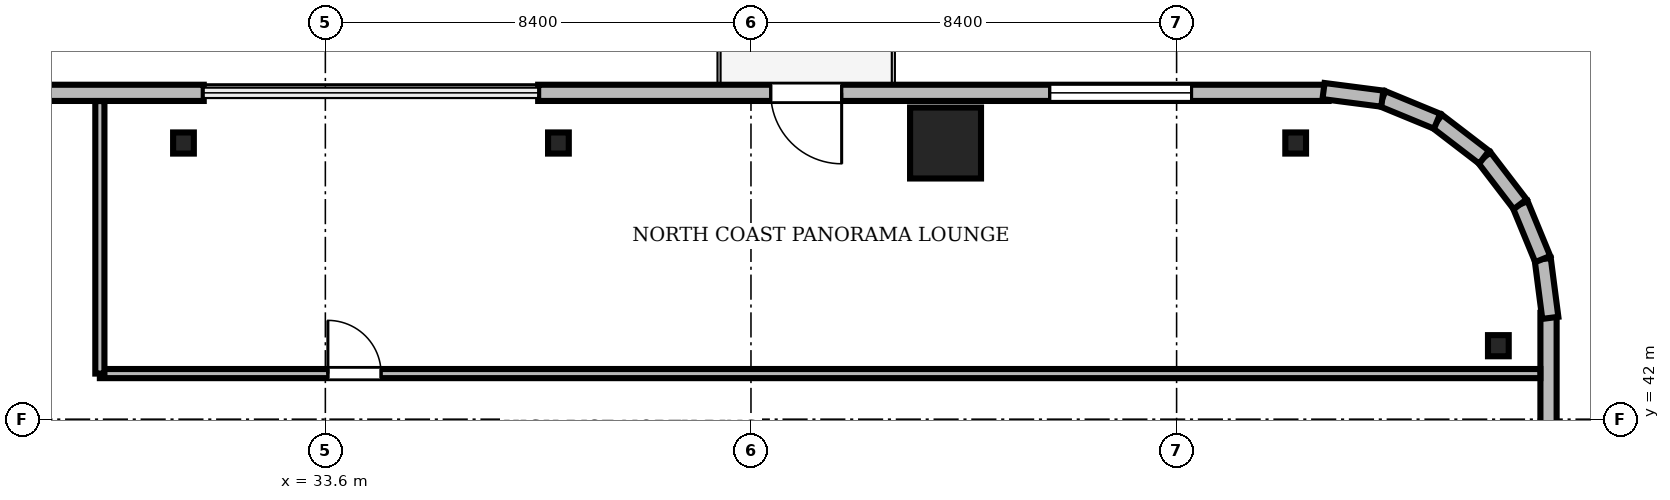
"""IFC4 building model, lengths in metres.
Left out: names, types, materials, properties, quantities, classifications, styles, units other than length and angle.
Written with IfcOpenShell. Run it as: python <this file> out.ifc"""

import sys

from ifc_helpers import new_model, si_unit, direction, frame, frame_2d, origin, origin_2d, place, context, subcontext, project, spatial, rectangle, i_section, extrude, source, transform, mapped, element, fill, save


model = new_model("IFC4")
c1 = context("Model", 3, precision=1e-05, world=origin(), true_north=direction((0.0, 1.0)))
c2 = subcontext(c1, "Body", "Model", "MODEL_VIEW")
j1 = project(units=[si_unit("LENGTHUNIT", "METRE"), si_unit("PLANEANGLEUNIT", "RADIAN")], contexts=[c1])
p1 = place(None, origin())
s1 = spatial("IfcSite", under=j1, at=p1, CompositionType="ELEMENT")
p2 = place(p1, origin())
s2 = spatial("IfcBuilding", under=s1, at=p2, CompositionType="ELEMENT")
p3 = place(p2, frame((0.0, 0.0, 233.55)))
s3 = spatial("IfcBuildingStorey", under=s2, at=p3, CompositionType="ELEMENT", Elevation=233.55)
m1 = source(origin(), c2, "Body", "SweptSolid", [
    extrude(rectangle(XDim=1.4, YDim=1.4, at=origin_2d()), origin(), (0.0, 0.0, 1.0), 3.1),
])
p4 = place(p3, frame((45.84, 47.45, 0.0), z_axis=(0.0, 0.0, 1.0), x_axis=(1.0, 0.0, 0.0)))
e1 = element("IfcColumn", 1, at=p4, inside=s3, PredefinedType="COLUMN", context=c2, shape_type="MappedRepresentation", body=[
    mapped(m1, transform((0.0, 0.0, 0.0), scale=1.0)),
])
m2 = source(origin(), c2, "Body", "SweptSolid", [
    extrude(i_section(OverallWidth=0.409, OverallDepth=0.417, WebThickness=0.021, FlangeThickness=0.033, FilletRadius=0.015, at=origin_2d()), origin(), (0.0, 0.0, 1.0), 3.1),
])
for number, where, z_axis, x_axis in (
    (2, (56.75, 43.45, 0.0), (0.0, 0.0, 1.0), (1.0, 0.0, 0.0)),
    (3, (52.75, 47.45, 0.0), (0.0, 0.0, 1.0), (1.0, 0.0, 0.0)),
    (4, (38.2, 47.45, 0.0), (0.0, 0.0, 1.0), (1.0, 0.0, 0.0)),
    (5, (30.8, 47.45, 0.0), (0.0, 0.0, 1.0), (1.0, 0.0, 0.0)),
):
    element("IfcColumn", number, at=place(p3, frame(where, z_axis=z_axis, x_axis=x_axis)), inside=s3, PredefinedType="COLUMN", context=c2, shape_type="MappedRepresentation", body=[
        mapped(m2, transform((0.0, 0.0, 0.0), scale=1.0)),
    ])
m3 = source(origin(), c2, "Body", "SweptSolid", [
    extrude(rectangle(XDim=15.6, YDim=0.32, at=frame_2d((7.8, 0.0))), origin(), (0.0, 0.0, 1.0), 3.1),
])
p5 = place(p3, frame((53.4, 48.44, 0.0), z_axis=(0.0, 0.0, 1.0), x_axis=(-1.0, 0.0, 0.0)))
e6 = element("IfcWall", 6, at=p5, inside=s3, PredefinedType="SOLIDWALL", context=c2, shape_type="MappedRepresentation", body=[
    mapped(m3, transform((0.0, 0.0, 0.0), scale=1.0)),
])
m4 = source(origin(), c2, "Body", "SweptSolid", [
    extrude(rectangle(XDim=1.4, YDim=2.3, at=frame_2d((0.7, 1.15))), frame((0.0, 0.17, 0.0), z_axis=(0.0, -1.0, 0.0), x_axis=(1.0, 0.0, 0.0)), (0.0, 0.0, 1.0), 0.34),
])
p6 = place(p5, frame((9.61, 0.0, 0.0)))
e7 = element("IfcOpeningElement", 7, at=p6, cuts=e6, PredefinedType="OPENING", context=c2, shape_type="MappedRepresentation", body=[
    mapped(m4, transform((0.0, 0.0, 0.0), scale=1.0)),
])
m5 = source(origin(), c2, "Body", "SweptSolid", [
    extrude(rectangle(XDim=2.8, YDim=2.4, at=frame_2d((1.4, 1.2))), frame((0.0, 0.17, 0.0), z_axis=(0.0, -1.0, 0.0), x_axis=(1.0, 0.0, 0.0)), (0.0, 0.0, 1.0), 0.34),
])
p7 = place(p5, frame((2.705, 0.0, 0.44)))
e8 = element("IfcOpeningElement", 8, at=p7, cuts=e6, PredefinedType="OPENING", context=c2, shape_type="MappedRepresentation", body=[
    mapped(m5, transform((0.0, 0.0, 0.0), scale=1.0)),
])
p8 = place(p3, frame((31.2, 48.44, 0.0), z_axis=(0.0, 0.0, 1.0), x_axis=(-1.0, 0.0, 0.0)))
e9 = element("IfcWall", 9, at=p8, inside=s3, PredefinedType="SOLIDWALL", context=c2, shape_type="MappedRepresentation", body=[
    mapped(m3, transform((0.0, 0.0, 0.0), scale=1.0)),
])
p9 = place(p8, frame((10.095, 0.0, 0.44)))
e10 = element("IfcOpeningElement", 10, at=p9, cuts=e9, PredefinedType="OPENING", context=c2, shape_type="MappedRepresentation", body=[
    mapped(m5, transform((0.0, 0.0, 0.0), scale=1.0)),
])
m6 = source(origin(), c2, "Body", "SweptSolid", [
    extrude(rectangle(XDim=15.6, YDim=0.32, at=frame_2d((7.8, 0.0))), origin(), (0.0, 0.0, 1.0), 3.1),
])
p10 = place(p3, frame((57.74, 28.5, 0.0), z_axis=(0.0, 0.0, 1.0), x_axis=(0.0, 1.0, 0.0)))
e11 = element("IfcWall", 11, at=p10, inside=s3, PredefinedType="SOLIDWALL", context=c2, shape_type="MappedRepresentation", body=[
    mapped(m6, transform((0.0, 0.0, 0.0), scale=1.0)),
])
p11 = place(p10, frame((10.095, 0.0, 0.44)))
e12 = element("IfcOpeningElement", 12, at=p11, cuts=e11, PredefinedType="OPENING", context=c2, shape_type="MappedRepresentation", body=[
    mapped(m5, transform((0.0, 0.0, 0.0), scale=1.0)),
])
m7 = source(origin(), c2, "Body", "SweptSolid", [
    extrude(rectangle(XDim=1.17, YDim=0.32, at=frame_2d((0.585, 0.0))), origin(), (0.0, 0.0, 1.0), 3.1),
])
p12 = place(p3, frame((57.776, 44.0, 0.0), z_axis=(0.0, 0.0, 1.0), x_axis=(-0.128295670475, 0.991735963317, 0.0)))
e13 = element("IfcWall", 13, at=p12, inside=s3, PredefinedType="SOLIDWALL", context=c2, shape_type="MappedRepresentation", body=[
    mapped(m7, transform((0.0, 0.0, 0.0), scale=1.0)),
])
m8 = source(origin(), c2, "Body", "SweptSolid", [
    extrude(rectangle(XDim=1.169, YDim=0.32, at=frame_2d((0.584, 0.0))), origin(), (0.0, 0.0, 1.0), 3.1),
])
p13 = place(p3, frame((57.625, 45.16, 0.0), z_axis=(0.0, 0.0, 1.0), x_axis=(-0.381054331552, 0.924552646638, 0.0)))
e14 = element("IfcWall", 14, at=p13, inside=s3, PredefinedType="SOLIDWALL", context=c2, shape_type="MappedRepresentation", body=[
    mapped(m8, transform((0.0, 0.0, 0.0), scale=1.0)),
])
m9 = source(origin(), c2, "Body", "SweptSolid", [
    extrude(rectangle(XDim=1.169, YDim=0.32, at=frame_2d((0.584, 0.0))), origin(), (0.0, 0.0, 1.0), 3.1),
])
p14 = place(p3, frame((57.18, 46.241, 0.0), z_axis=(0.0, 0.0, 1.0), x_axis=(-0.608387696831, 0.793639975269, 0.0)))
e15 = element("IfcWall", 15, at=p14, inside=s3, PredefinedType="SOLIDWALL", context=c2, shape_type="MappedRepresentation", body=[
    mapped(m9, transform((0.0, 0.0, 0.0), scale=1.0)),
])
m10 = source(origin(), c2, "Body", "SweptSolid", [
    extrude(rectangle(XDim=1.169, YDim=0.32, at=frame_2d((0.584, 0.0))), origin(), (0.0, 0.0, 1.0), 3.1),
])
p15 = place(p3, frame((56.469, 47.169, 0.0), z_axis=(0.0, 0.0, 1.0), x_axis=(-0.793663520347, 0.608356981114, 0.0)))
e16 = element("IfcWall", 16, at=p15, inside=s3, PredefinedType="SOLIDWALL", context=c2, shape_type="MappedRepresentation", body=[
    mapped(m10, transform((0.0, 0.0, 0.0), scale=1.0)),
])
p16 = place(p3, frame((55.541, 47.88, 0.0), z_axis=(0.0, 0.0, 1.0), x_axis=(-0.924552646638, 0.381054331552, 0.0)))
e17 = element("IfcWall", 17, at=p16, inside=s3, PredefinedType="SOLIDWALL", context=c2, shape_type="MappedRepresentation", body=[
    mapped(m8, transform((0.0, 0.0, 0.0), scale=1.0)),
])
p17 = place(p3, frame((54.46, 48.325, 0.0), z_axis=(0.0, 0.0, 1.0), x_axis=(-0.991735963317, 0.128295670475, 0.0)))
e18 = element("IfcWall", 18, at=p17, inside=s3, PredefinedType="SOLIDWALL", context=c2, shape_type="MappedRepresentation", body=[
    mapped(m7, transform((0.0, 0.0, 0.0), scale=1.0)),
])
m11 = source(origin(), c2, "Body", "SweptSolid", [
    extrude(rectangle(XDim=28.428, YDim=0.18, at=frame_2d((14.214, 0.0))), origin(), (0.0, 0.0, 1.0), 2.376),
])
p18 = place(p3, frame((29.15, 42.9, 0.0), z_axis=(0.0, 0.0, 1.0), x_axis=(1.0, 0.0, 0.0)))
e19 = element("IfcWall", 19, at=p18, inside=s3, PredefinedType="PARTITIONING", context=c2, shape_type="MappedRepresentation", body=[
    mapped(m11, transform((0.0, 0.0, 0.0), scale=1.0)),
])
m12 = source(origin(), c2, "Body", "SweptSolid", [
    extrude(rectangle(XDim=1.05, YDim=2.2, at=frame_2d((0.525, 1.1))), frame((0.0, 0.1, 0.0), z_axis=(0.0, -1.0, 0.0), x_axis=(1.0, 0.0, 0.0)), (0.0, 0.0, 1.0), 0.2),
])
p19 = place(p18, frame((4.5, 0.0, 0.0)))
e20 = element("IfcOpeningElement", 20, at=p19, cuts=e19, PredefinedType="OPENING", context=c2, shape_type="MappedRepresentation", body=[
    mapped(m12, transform((0.0, 0.0, 0.0), scale=1.0)),
])
m13 = source(origin(), c2, "Body", "SweptSolid", [
    extrude(rectangle(XDim=5.378, YDim=0.18, at=frame_2d((2.689, 0.0))), origin(), (0.0, 0.0, 1.0), 2.376),
])
p20 = place(p3, frame((29.15, 42.9, 0.0), z_axis=(0.0, 0.0, 1.0), x_axis=(0.0, 1.0, 0.0)))
e21 = element("IfcWall", 21, at=p20, inside=s3, PredefinedType="PARTITIONING", context=c2, shape_type="MappedRepresentation", body=[
    mapped(m13, transform((0.0, 0.0, 0.0), scale=1.0)),
])
m14 = source(origin(), c2, "Body", "SweptSolid", [
    extrude(rectangle(XDim=1.4, YDim=2.3, at=frame_2d((0.7, 1.15))), frame((0.0, 0.025, 0.0), z_axis=(0.0, -1.0, 0.0), x_axis=(1.0, 0.0, 0.0)), (0.0, 0.0, 1.0), 0.05),
])
p21 = place(p6, frame((1.4, 0.0, 0.0), z_axis=(0.0, 0.0, 1.0), x_axis=(-1.0, 0.0, 0.0)))
e22 = element("IfcDoor", 22, at=p21, inside=s3, OperationType="DOUBLE_DOOR_SLIDING", PredefinedType="DOOR", context=c2, shape_type="MappedRepresentation", body=[
    mapped(m14, transform((0.0, 0.0, 0.0), scale=1.0)),
])
fill(e7, e22)
m15 = source(origin(), c2, "Body", "SweptSolid", [
    extrude(rectangle(XDim=2.8, YDim=2.4, at=frame_2d((1.4, 1.2))), frame((0.0, 0.03, 0.0), z_axis=(0.0, -1.0, 0.0), x_axis=(1.0, 0.0, 0.0)), (0.0, 0.0, 1.0), 0.06),
])
p22 = place(p7, origin())
e23 = element("IfcWindow", 23, at=p22, inside=s3, PartitioningType="SINGLE_PANEL", PredefinedType="WINDOW", context=c2, shape_type="MappedRepresentation", body=[
    mapped(m15, transform((0.0, 0.0, 0.0), scale=1.0)),
])
fill(e8, e23)
m16 = source(origin(), c2, "Body", "SweptSolid", [
    extrude(rectangle(XDim=1.05, YDim=2.2, at=frame_2d((0.525, 1.1))), frame((0.0, 0.025, 0.0), z_axis=(0.0, -1.0, 0.0), x_axis=(1.0, 0.0, 0.0)), (0.0, 0.0, 1.0), 0.05),
])
p23 = place(p19, origin())
e24 = element("IfcDoor", 24, at=p23, inside=s3, OperationType="SINGLE_SWING_LEFT", PredefinedType="DOOR", context=c2, shape_type="MappedRepresentation", body=[
    mapped(m16, transform((0.0, 0.0, 0.0), scale=1.0)),
])
fill(e20, e24)
save(model, sys.argv[1])
